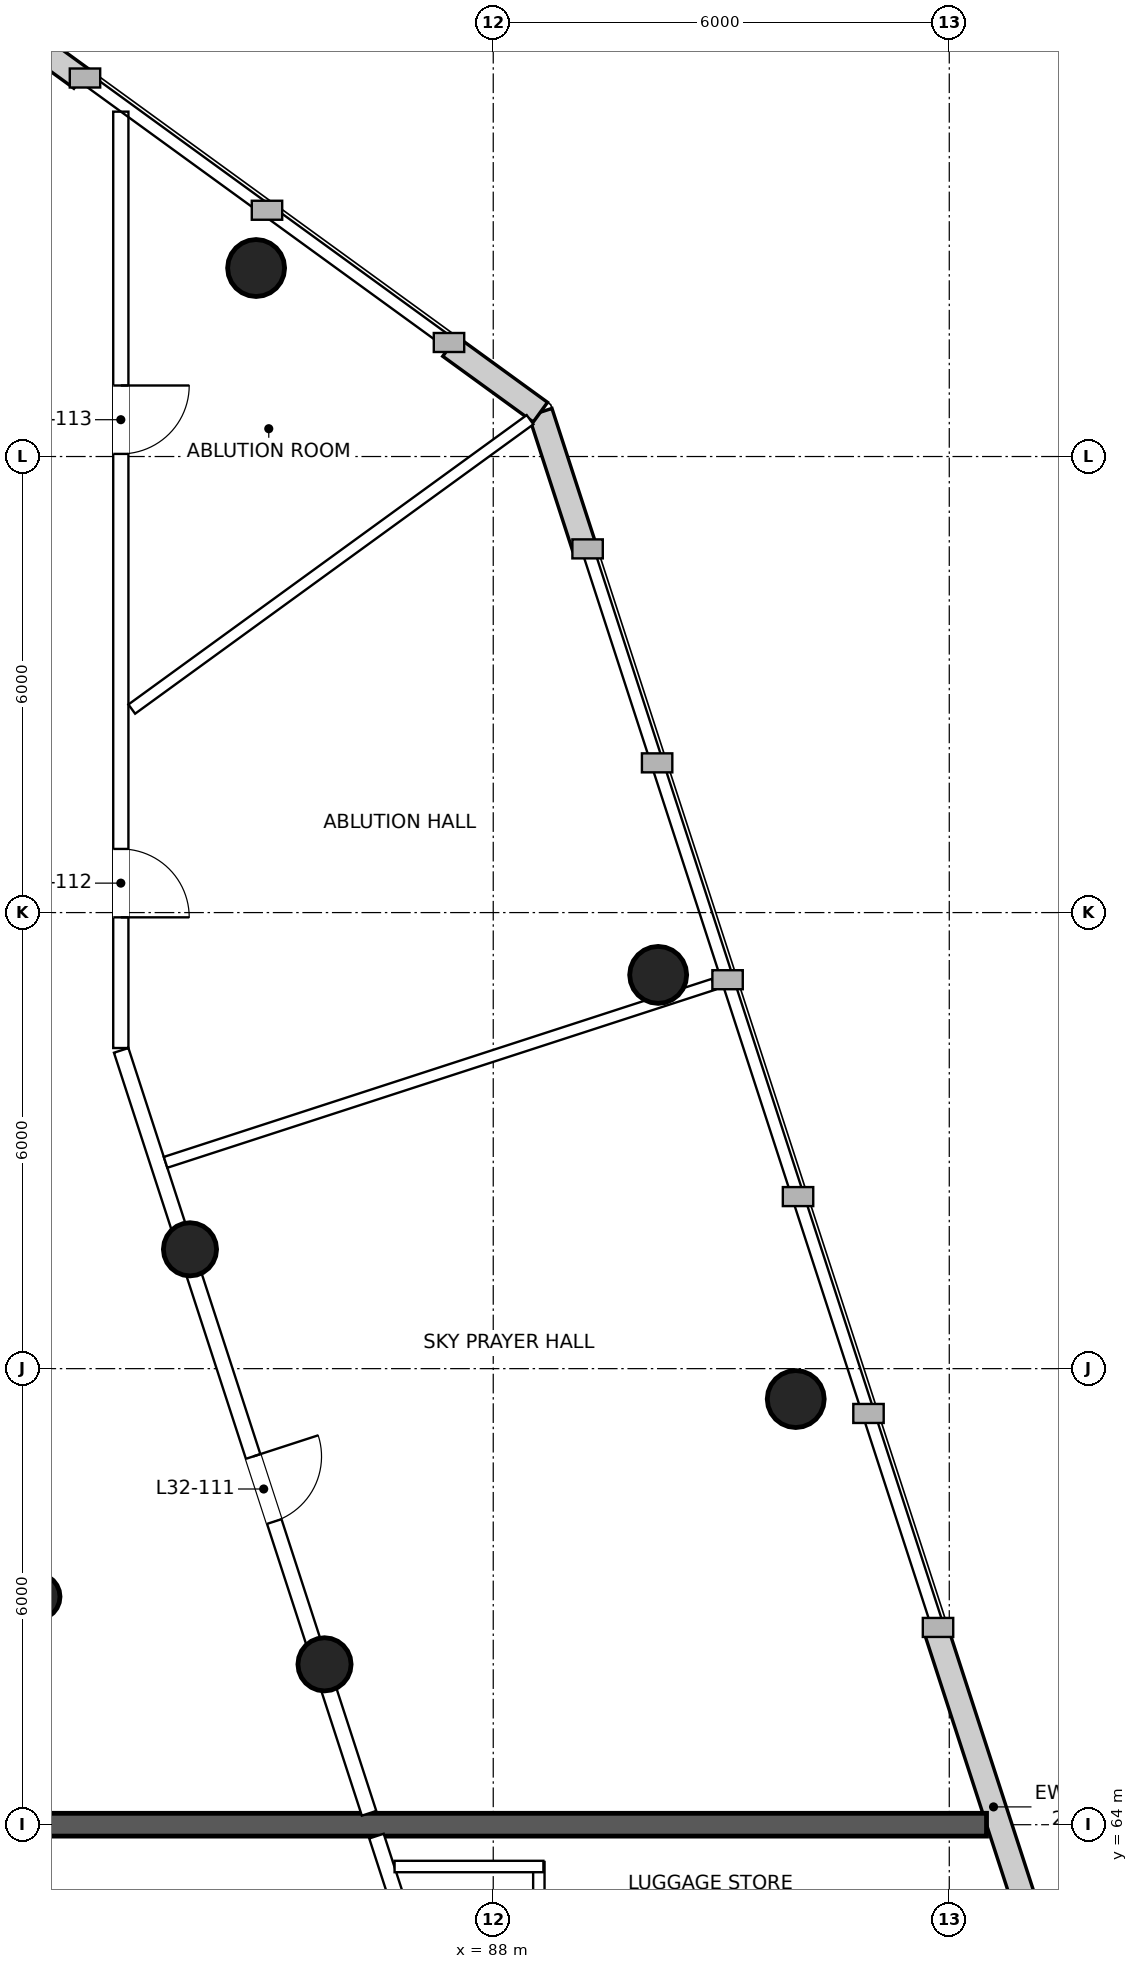
"""IFC4 building model, lengths in metres.
Left out: names, types, materials, properties, quantities, classifications, styles, units other than length and angle.
Written with IfcOpenShell. Run it as: python <this file> out.ifc"""

import sys

from ifc_helpers import new_model, si_unit, direction, frame, frame_2d, origin, origin_2d, place, context, subcontext, project, spatial, rectangle, circle, extrude, element, fill, save


model = new_model("IFC4")
c1 = context("Model", 3, precision=1e-05, world=origin(), true_north=direction((0.0, 1.0)))
c2 = subcontext(c1, "Body", "Model", "MODEL_VIEW")
j1 = project(units=[si_unit("LENGTHUNIT", "METRE"), si_unit("PLANEANGLEUNIT", "RADIAN")], contexts=[c1])
p1 = place(None, origin())
s1 = spatial("IfcSite", under=j1, at=p1, CompositionType="ELEMENT")
p2 = place(p1, origin())
s2 = spatial("IfcBuilding", under=s1, at=p2, CompositionType="ELEMENT")
p3 = place(p2, frame((0.0, 0.0, 142.6)))
s3 = spatial("IfcBuildingStorey", under=s2, at=p3, CompositionType="ELEMENT", Elevation=142.6)
for number, where, z_axis, x_axis in (
    (1, (91.98, 69.6, 0.0), (0.0, 0.0, 1.0), (1.0, 0.0, 0.0)),
    (2, (90.17, 75.18, 0.0), (0.0, 0.0, 1.0), (1.0, 0.0, 0.0)),
    (3, (84.88, 84.48, 0.0), (0.0, 0.0, 1.0), (1.0, 0.0, 0.0)),
):
    element("IfcColumn", number, at=place(p3, frame(where, z_axis=z_axis, x_axis=x_axis)), inside=s3, PredefinedType="COLUMN", context=c2, shape_type="SweptSolid", body=[
        extrude(circle(Radius=0.375, at=origin_2d()), origin(), (0.0, 0.0, 1.0), 6.0),
    ])
for number, where, z_axis, x_axis in (
    (4, (85.78, 66.11, 0.0), (0.0, 0.0, 1.0), (1.0, 0.0, 0.0)),
    (5, (84.01, 71.57, 0.0), (0.0, 0.0, 1.0), (1.0, 0.0, 0.0)),
):
    element("IfcColumn", number, at=place(p3, frame(where, z_axis=z_axis, x_axis=x_axis)), inside=s3, PredefinedType="COLUMN", context=c2, shape_type="SweptSolid", body=[
        extrude(circle(Radius=0.35, at=origin_2d()), origin(), (0.0, 0.0, 1.0), 6.0),
    ])
p4 = place(p3, frame((82.0, 67.0, 0.0), z_axis=(0.0, 0.0, 1.0), x_axis=(1.0, 0.0, 0.0)))
e6 = element("IfcColumn", 6, at=p4, inside=s3, PredefinedType="COLUMN", context=c2, shape_type="SweptSolid", body=[
    extrude(circle(Radius=0.3, at=origin_2d()), origin(), (0.0, 0.0, 1.0), 6.0),
])
p5 = place(p3, frame((95.333, 61.922, 0.0), z_axis=(0.0, 0.0, 1.0), x_axis=(-0.309003189113, 0.951061001786, 0.0)))
e7 = element("IfcWall", 7, at=p5, inside=s3, PredefinedType="SOLIDWALL", context=c2, shape_type="SweptSolid", body=[
    extrude(rectangle(XDim=4.862, YDim=0.32, at=frame_2d((2.431, 0.0))), origin(), (0.0, 0.0, 1.0), 5.7),
])
p6 = place(p3, frame((89.196, 80.812, 0.0), z_axis=(0.0, 0.0, 1.0), x_axis=(-0.309020851273, 0.951055263104, 0.0)))
e8 = element("IfcWall", 8, at=p6, inside=s3, PredefinedType="SOLIDWALL", context=c2, shape_type="SweptSolid", body=[
    extrude(rectangle(XDim=1.862, YDim=0.32, at=frame_2d((0.931, 0.0))), origin(), (0.0, 0.0, 1.0), 5.7),
])
for number, where, z_axis, x_axis in (
    (9, (88.62, 82.583, 0.0), (0.0, 0.0, 1.0), (-0.809, 0.588, 0.0)),
    (10, (82.576, 86.975, 0.0), (0.0, 0.0, 1.0), (-0.809, 0.588, 0.0)),
):
    element("IfcWall", number, at=place(p3, frame(where, z_axis=z_axis, x_axis=x_axis)), inside=s3, PredefinedType="SOLIDWALL", context=c2, shape_type="SweptSolid", body=[
        extrude(rectangle(XDim=1.472, YDim=0.32, at=frame_2d((0.736, 0.0))), origin(), (0.0, 0.0, 1.0), 5.7),
    ])
p7 = place(p3, frame((45.51, 64.0, 0.0), z_axis=(0.0, 0.0, 1.0), x_axis=(1.0, 0.0, 0.0)))
e11 = element("IfcWall", 11, at=p7, inside=s3, PredefinedType="PARTITIONING", context=c2, shape_type="SweptSolid", body=[
    extrude(rectangle(XDim=48.98, YDim=0.3, at=frame_2d((24.49, 0.0))), origin(), (0.0, 0.0, 1.0), 5.0),
])
p8 = place(p7, frame((15.283, 0.0, 0.0)))
e12 = element("IfcOpeningElement", 12, at=p8, cuts=e11, PredefinedType="OPENING", context=c2, shape_type="SweptSolid", body=[
    extrude(rectangle(XDim=2.0, YDim=2.1, at=frame_2d((1.0, 1.05))), frame((0.0, 0.16, 0.0), z_axis=(0.0, -1.0, 0.0), x_axis=(1.0, 0.0, 0.0)), (0.0, 0.0, 1.0), 0.32),
])
p9 = place(p7, frame((31.698, 0.0, 0.0)))
e13 = element("IfcOpeningElement", 13, at=p9, cuts=e11, PredefinedType="OPENING", context=c2, shape_type="SweptSolid", body=[
    extrude(rectangle(XDim=2.0, YDim=2.1, at=frame_2d((1.0, 1.05))), frame((0.0, 0.16, 0.0), z_axis=(0.0, -1.0, 0.0), x_axis=(1.0, 0.0, 0.0)), (0.0, 0.0, 1.0), 0.32),
])
p10 = place(p3, frame((83.1, 86.537, 0.0), z_axis=(0.0, 0.0, 1.0), x_axis=(0.0, -1.0, 0.0)))
e14 = element("IfcWall", 14, at=p10, inside=s3, PredefinedType="PARTITIONING", context=c2, shape_type="SweptSolid", body=[
    extrude(rectangle(XDim=12.319, YDim=0.2, at=frame_2d((6.16, 0.0))), origin(), (0.0, 0.0, 1.0), 5.25),
])
p11 = place(p10, frame((9.7, 0.0, 0.0)))
e15 = element("IfcOpeningElement", 15, at=p11, cuts=e14, PredefinedType="OPENING", context=c2, shape_type="SweptSolid", body=[
    extrude(rectangle(XDim=0.9, YDim=2.1, at=frame_2d((0.45, 1.05))), frame((0.0, 0.11, 0.0), z_axis=(0.0, -1.0, 0.0), x_axis=(1.0, 0.0, 0.0)), (0.0, 0.0, 1.0), 0.22),
])
p12 = place(p10, frame((3.603, 0.0, 0.0)))
e16 = element("IfcOpeningElement", 16, at=p12, cuts=e14, PredefinedType="OPENING", context=c2, shape_type="SweptSolid", body=[
    extrude(rectangle(XDim=0.9, YDim=2.1, at=frame_2d((0.45, 1.05))), frame((0.0, 0.11, 0.0), z_axis=(0.0, -1.0, 0.0), x_axis=(1.0, 0.0, 0.0)), (0.0, 0.0, 1.0), 0.22),
])
p13 = place(p3, frame((83.105, 74.187, 0.0), z_axis=(0.0, 0.0, 1.0), x_axis=(0.309008133723, -0.95105939525, 0.0)))
e17 = element("IfcWall", 17, at=p13, inside=s3, PredefinedType="PARTITIONING", context=c2, shape_type="SweptSolid", body=[
    extrude(rectangle(XDim=10.554, YDim=0.2, at=frame_2d((5.277, 0.0))), origin(), (0.0, 0.0, 1.0), 5.15),
])
p14 = place(p13, frame((5.618, 0.0, 0.0)))
e18 = element("IfcOpeningElement", 18, at=p14, cuts=e17, PredefinedType="OPENING", context=c2, shape_type="SweptSolid", body=[
    extrude(rectangle(XDim=0.9, YDim=2.1, at=frame_2d((0.45, 1.05))), frame((0.0, 0.11, 0.0), z_axis=(0.0, -1.0, 0.0), x_axis=(1.0, 0.0, 0.0)), (0.0, 0.0, 1.0), 0.22),
])
p15 = place(p3, frame((86.464, 63.85, 0.0), z_axis=(0.0, 0.0, 1.0), x_axis=(0.308951238916, -0.951077879026, 0.0)))
e19 = element("IfcWall", 19, at=p15, inside=s3, PredefinedType="PARTITIONING", context=c2, shape_type="SweptSolid", body=[
    extrude(rectangle(XDim=1.965, YDim=0.2, at=frame_2d((0.983, 0.0))), origin(), (0.0, 0.0, 1.0), 5.0),
])
p16 = place(p3, frame((88.484, 82.484, 0.0), z_axis=(0.0, 0.0, 1.0), x_axis=(-0.80901309186, -0.587790623606, 0.0)))
e20 = element("IfcWall", 20, at=p16, inside=s3, PredefinedType="PARTITIONING", context=c2, shape_type="SweptSolid", body=[
    extrude(rectangle(XDim=6.477, YDim=0.15, at=frame_2d((3.239, 0.0))), origin(), (0.0, 0.0, 1.0), 5.0),
])
p17 = place(p3, frame((90.898, 75.056, 0.0), z_axis=(0.0, 0.0, 1.0), x_axis=(-0.951058681979, -0.309010329007, 0.0)))
e21 = element("IfcWall", 21, at=p17, inside=s3, PredefinedType="PARTITIONING", context=c2, shape_type="SweptSolid", body=[
    extrude(rectangle(XDim=7.58, YDim=0.15, at=frame_2d((3.79, 0.0))), origin(), (0.0, 0.0, 1.0), 5.25),
])
p18 = place(p3, frame((88.6, 61.997, 0.0), z_axis=(0.0, 0.0, 1.0), x_axis=(0.0, 1.0, 0.0)))
e22 = element("IfcWall", 22, at=p18, inside=s3, PredefinedType="PARTITIONING", context=c2, shape_type="SweptSolid", body=[
    extrude(rectangle(XDim=1.513, YDim=0.15, at=frame_2d((0.756, 0.0))), origin(), (0.0, 0.0, 1.0), 5.7),
])
p19 = place(p3, frame((88.66, 63.45, 0.0), z_axis=(0.0, 0.0, 1.0), x_axis=(-1.0, 0.0, 0.0)))
e23 = element("IfcWall", 23, at=p19, inside=s3, PredefinedType="PARTITIONING", context=c2, shape_type="SweptSolid", body=[
    extrude(rectangle(XDim=1.958, YDim=0.15, at=frame_2d((0.979, 0.0))), origin(), (0.0, 0.0, 1.0), 5.0),
])
p20 = place(p14, origin())
e24 = element("IfcDoor", 24, at=p20, inside=s3, OperationType="SINGLE_SWING_LEFT", PredefinedType="DOOR", context=c2, shape_type="SweptSolid", body=[
    extrude(rectangle(XDim=0.9, YDim=2.1, at=frame_2d((0.45, 1.05))), frame((0.0, 0.025, 0.0), z_axis=(0.0, -1.0, 0.0), x_axis=(1.0, 0.0, 0.0)), (0.0, 0.0, 1.0), 0.05),
])
fill(e18, e24)
p21 = place(p11, origin())
e25 = element("IfcDoor", 25, at=p21, inside=s3, OperationType="SINGLE_SWING_RIGHT", PredefinedType="DOOR", context=c2, shape_type="SweptSolid", body=[
    extrude(rectangle(XDim=0.9, YDim=2.1, at=frame_2d((0.45, 1.05))), frame((0.0, 0.025, 0.0), z_axis=(0.0, -1.0, 0.0), x_axis=(1.0, 0.0, 0.0)), (0.0, 0.0, 1.0), 0.05),
])
fill(e15, e25)
p22 = place(p12, origin())
e26 = element("IfcDoor", 26, at=p22, inside=s3, OperationType="SINGLE_SWING_LEFT", PredefinedType="DOOR", context=c2, shape_type="SweptSolid", body=[
    extrude(rectangle(XDim=0.9, YDim=2.1, at=frame_2d((0.45, 1.05))), frame((0.0, 0.025, 0.0), z_axis=(0.0, -1.0, 0.0), x_axis=(1.0, 0.0, 0.0)), (0.0, 0.0, 1.0), 0.05),
])
fill(e16, e26)
save(model, sys.argv[1])
